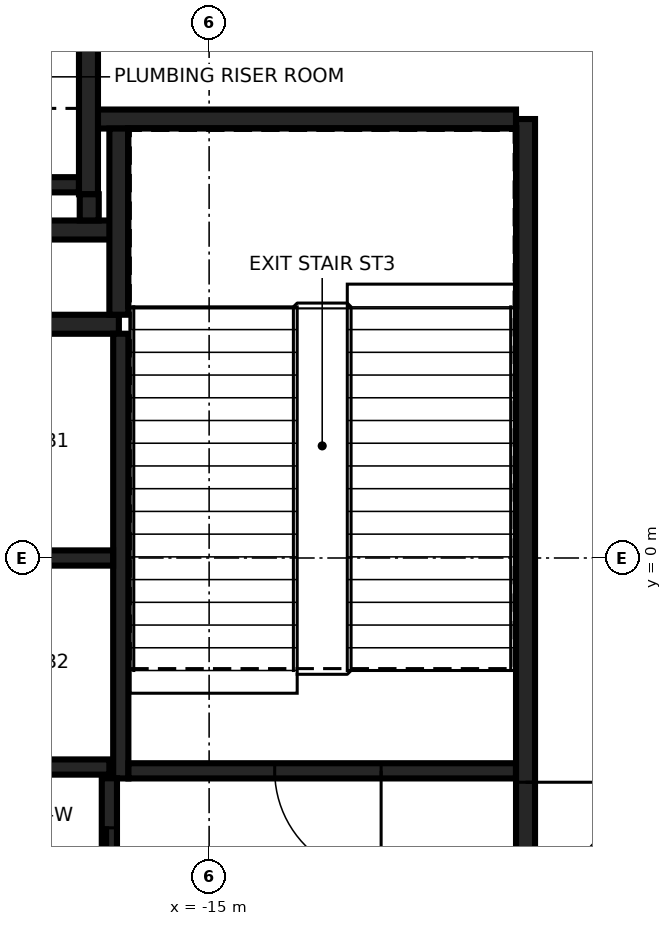
"""IFC4 building model, lengths in metres.
Left out: names, types, materials, properties, quantities, classifications, styles, units other than length and angle.
Written with IfcOpenShell. Run it as: python <this file> out.ifc"""

import sys

from ifc_helpers import new_model, si_unit, direction, frame, frame_2d, origin, place, context, subcontext, project, spatial, rectangle, extrude, element, fill, save


model = new_model("IFC4")
c1 = context("Model", 3, precision=1e-05, world=origin(), true_north=direction((0.0, 1.0)))
c2 = subcontext(c1, "Body", "Model", "MODEL_VIEW")
j1 = project(units=[si_unit("LENGTHUNIT", "METRE"), si_unit("PLANEANGLEUNIT", "RADIAN")], contexts=[c1])
p1 = place(None, origin())
s1 = spatial("IfcSite", under=j1, at=p1, CompositionType="ELEMENT")
p2 = place(p1, origin())
s2 = spatial("IfcBuilding", under=s1, at=p2, CompositionType="ELEMENT")
p3 = place(p2, frame((0.0, 0.0, 123.8)))
s3 = spatial("IfcBuildingStorey", under=s2, at=p3, CompositionType="ELEMENT", Elevation=123.8)
p4 = place(p3, frame((-10.837, 5.775, 0.0), z_axis=(0.0, 0.0, 1.0), x_axis=(0.0, -1.0, 0.0)))
e1 = element("IfcWall", 1, at=p4, inside=s3, PredefinedType="SHEAR", context=c2, shape_type="SweptSolid", body=[
    extrude(rectangle(XDim=11.55, YDim=0.25, at=frame_2d((5.775, 0.0))), origin(), (0.0, 0.0, 1.0), 4.6),
])
p5 = place(p4, frame((10.025, 0.0, 0.0)))
e2 = element("IfcOpeningElement", 2, at=p5, cuts=e1, PredefinedType="OPENING", context=c2, shape_type="SweptSolid", body=[
    extrude(rectangle(XDim=1.2, YDim=2.1, at=frame_2d((0.6, 1.05))), frame((0.0, 0.135, 0.0), z_axis=(0.0, -1.0, 0.0), x_axis=(1.0, 0.0, 0.0)), (0.0, 0.0, 1.0), 0.27),
])
p6 = place(p4, frame((8.725, 0.0, 0.0)))
e3 = element("IfcOpeningElement", 3, at=p6, cuts=e1, PredefinedType="OPENING", context=c2, shape_type="SweptSolid", body=[
    extrude(rectangle(XDim=1.2, YDim=2.1, at=frame_2d((0.6, 1.05))), frame((0.0, 0.135, 0.0), z_axis=(0.0, -1.0, 0.0), x_axis=(1.0, 0.0, 0.0)), (0.0, 0.0, 1.0), 0.27),
])
p7 = place(p3, frame((-16.472, 5.775, 0.0), z_axis=(0.0, 0.0, 1.0), x_axis=(1.0, 0.0, 0.0)))
e4 = element("IfcWall", 4, at=p7, inside=s3, PredefinedType="SHEAR", context=c2, shape_type="SweptSolid", body=[
    extrude(rectangle(XDim=5.51, YDim=0.25, at=frame_2d((2.755, 0.0))), origin(), (0.0, 0.0, 1.0), 4.6),
])
p8 = place(p3, frame((-19.387, 3.075, 0.0), z_axis=(0.0, 0.0, 1.0), x_axis=(1.0, 0.0, 0.0)))
e5 = element("IfcWall", 5, at=p8, inside=s3, PredefinedType="SHEAR", context=c2, shape_type="SweptSolid", body=[
    extrude(rectangle(XDim=3.2, YDim=0.25, at=frame_2d((1.6, 0.0))), origin(), (0.0, 0.0, 1.0), 4.6),
])
p9 = place(p3, frame((-16.587, 7.65, 0.0), z_axis=(0.0, 0.0, 1.0), x_axis=(0.0, -1.0, 0.0)))
e6 = element("IfcWall", 6, at=p9, inside=s3, PredefinedType="SHEAR", context=c2, shape_type="SweptSolid", body=[
    extrude(rectangle(XDim=2.865, YDim=0.25, at=frame_2d((1.432, 0.0))), origin(), (0.0, 0.0, 1.0), 4.6),
])
p10 = place(p3, frame((-16.302, 4.315, 0.0), z_axis=(0.0, 0.0, 1.0), x_axis=(-1.0, 0.0, 0.0)))
e7 = element("IfcWall", 7, at=p10, inside=s3, PredefinedType="SHEAR", context=c2, shape_type="SweptSolid", body=[
    extrude(rectangle(XDim=3.085, YDim=0.25, at=frame_2d((1.542, 0.0))), origin(), (0.0, 0.0, 1.0), 4.6),
])
p11 = place(p3, frame((-16.187, 3.2, 0.0), z_axis=(0.0, 0.0, 1.0), x_axis=(0.0, 1.0, 0.0)))
e8 = element("IfcWall", 8, at=p11, inside=s3, PredefinedType="SHEAR", context=c2, shape_type="SweptSolid", body=[
    extrude(rectangle(XDim=2.449, YDim=0.25, at=frame_2d((1.225, 0.0))), origin(), (0.0, 0.0, 1.0), 4.6),
])
p12 = place(p3, frame((-16.577, 4.785, 0.0), z_axis=(0.0, 0.0, 1.0), x_axis=(0.0, -1.0, 0.0)))
e9 = element("IfcWall", 9, at=p12, inside=s3, PredefinedType="SHEAR", context=c2, shape_type="SweptSolid", body=[
    extrude(rectangle(XDim=0.344, YDim=0.25, at=frame_2d((0.172, 0.0))), origin(), (0.0, 0.0, 1.0), 4.6),
])
p13 = place(p3, frame((-16.162, 2.951, 0.0), z_axis=(0.0, 0.0, 1.0), x_axis=(0.0, -1.0, 0.0)))
e10 = element("IfcWall", 10, at=p13, inside=s3, PredefinedType="SHEAR", context=c2, shape_type="SweptSolid", body=[
    extrude(rectangle(XDim=5.851, YDim=0.2, at=frame_2d((2.925, 0.0))), origin(), (0.0, 0.0, 1.0), 4.6),
])
p14 = place(p3, frame((-10.963, -2.8, 0.0), z_axis=(0.0, 0.0, 1.0), x_axis=(-1.0, 0.0, 0.0)))
e11 = element("IfcWall", 11, at=p14, inside=s3, PredefinedType="SHEAR", context=c2, shape_type="SweptSolid", body=[
    extrude(rectangle(XDim=5.098, YDim=0.2, at=frame_2d((2.549, 0.0))), origin(), (0.0, 0.0, 1.0), 4.6),
])
p15 = place(p14, frame((1.774, 0.0, 0.0)))
e12 = element("IfcOpeningElement", 12, at=p15, cuts=e11, PredefinedType="OPENING", context=c2, shape_type="SweptSolid", body=[
    extrude(rectangle(XDim=1.4, YDim=2.1, at=frame_2d((0.7, 1.05))), frame((0.0, 0.11, 0.0), z_axis=(0.0, -1.0, 0.0), x_axis=(1.0, 0.0, 0.0)), (0.0, 0.0, 1.0), 0.22),
])
p16 = place(p3, frame((-16.263, 0.0, 0.0), z_axis=(0.0, 0.0, 1.0), x_axis=(-1.0, 0.0, 0.0)))
e13 = element("IfcWall", 13, at=p16, inside=s3, PredefinedType="SHEAR", context=c2, shape_type="SweptSolid", body=[
    extrude(rectangle(XDim=3.198, YDim=0.2, at=frame_2d((1.599, 0.0))), origin(), (0.0, 0.0, 1.0), 4.6),
])
p17 = place(p3, frame((-19.511, 4.91, 0.0), z_axis=(0.0, 0.0, 1.0), x_axis=(1.0, 0.0, 0.0)))
e14 = element("IfcWall", 14, at=p17, inside=s3, PredefinedType="SHEAR", context=c2, shape_type="SweptSolid", body=[
    extrude(rectangle(XDim=2.798, YDim=0.2, at=frame_2d((1.399, 0.0))), origin(), (0.0, 0.0, 1.0), 4.6),
])
p18 = place(p17, frame((0.949, 0.0, 0.0)))
e15 = element("IfcOpeningElement", 15, at=p18, cuts=e14, PredefinedType="OPENING", context=c2, shape_type="SweptSolid", body=[
    extrude(rectangle(XDim=0.9, YDim=2.1, at=frame_2d((0.45, 1.05))), frame((0.0, 0.11, 0.0), z_axis=(0.0, -1.0, 0.0), x_axis=(1.0, 0.0, 0.0)), (0.0, 0.0, 1.0), 0.22),
])
p19 = place(p3, frame((-19.412, -2.75, 0.0), z_axis=(0.0, 0.0, 1.0), x_axis=(1.0, 0.0, 0.0)))
e16 = element("IfcWall", 16, at=p19, inside=s3, PredefinedType="SHEAR", context=c2, shape_type="SweptSolid", body=[
    extrude(rectangle(XDim=3.1, YDim=0.2, at=frame_2d((1.55, 0.0))), origin(), (0.0, 0.0, 1.0), 4.6),
])
p20 = place(p3, frame((-16.312, -2.898, 0.0), z_axis=(0.0, 0.0, 1.0), x_axis=(0.0, -1.0, 0.0)))
e17 = element("IfcWall", 17, at=p20, inside=s3, PredefinedType="SHEAR", context=c2, shape_type="SweptSolid", body=[
    extrude(rectangle(XDim=2.651, YDim=0.2, at=frame_2d((1.325, 0.0))), origin(), (0.0, 0.0, 1.0), 4.6),
])
p21 = place(p20, frame((0.652, 0.0, 0.0)))
e18 = element("IfcOpeningElement", 18, at=p21, cuts=e17, PredefinedType="OPENING", context=c2, shape_type="SweptSolid", body=[
    extrude(rectangle(XDim=1.3, YDim=2.1, at=frame_2d((0.65, 1.05))), frame((0.0, 0.11, 0.0), z_axis=(0.0, -1.0, 0.0), x_axis=(1.0, 0.0, 0.0)), (0.0, 0.0, 1.0), 0.22),
])
p22 = place(p21, origin())
e19 = element("IfcDoor", 19, at=p22, inside=s3, OperationType="SLIDING_TO_RIGHT", PredefinedType="DOOR", context=c2, shape_type="SweptSolid", body=[
    extrude(rectangle(XDim=1.3, YDim=2.1, at=frame_2d((0.65, 1.05))), frame((0.0, 0.025, 0.0), z_axis=(0.0, -1.0, 0.0), x_axis=(1.0, 0.0, 0.0)), (0.0, 0.0, 1.0), 0.05),
])
fill(e18, e19)
p23 = place(p6, origin())
e20 = element("IfcDoor", 20, at=p23, inside=s3, OperationType="SINGLE_SWING_RIGHT", PredefinedType="DOOR", context=c2, shape_type="SweptSolid", body=[
    extrude(rectangle(XDim=1.2, YDim=2.1, at=frame_2d((0.6, 1.05))), frame((0.0, 0.025, 0.0), z_axis=(0.0, -1.0, 0.0), x_axis=(1.0, 0.0, 0.0)), (0.0, 0.0, 1.0), 0.05),
])
fill(e3, e20)
p24 = place(p15, origin())
e21 = element("IfcDoor", 21, at=p24, inside=s3, OperationType="SINGLE_SWING_RIGHT", PredefinedType="DOOR", context=c2, shape_type="SweptSolid", body=[
    extrude(rectangle(XDim=1.4, YDim=2.1, at=frame_2d((0.7, 1.05))), frame((0.0, 0.025, 0.0), z_axis=(0.0, -1.0, 0.0), x_axis=(1.0, 0.0, 0.0)), (0.0, 0.0, 1.0), 0.05),
])
fill(e12, e21)
save(model, sys.argv[1])
